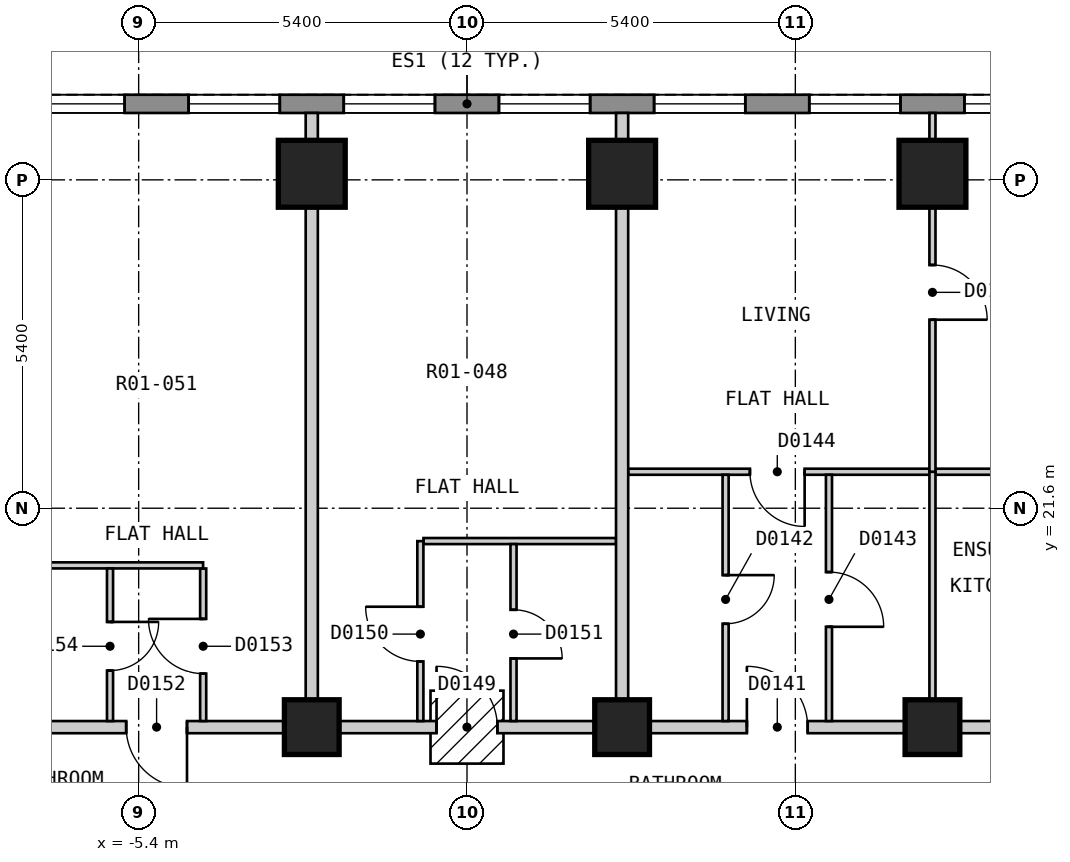
"""IFC4 building model, lengths in metres.
Left out: names, types, materials, properties, quantities, classifications, styles, units other than length and angle.
Written with IfcOpenShell. Run it as: python <this file> out.ifc"""

import sys

from ifc_helpers import new_model, si_unit, direction, frame, frame_2d, origin, origin_2d, place, context, subcontext, project, spatial, polyline, rectangle, outline, extrude, element, fill, save


model = new_model("IFC4")
c1 = context("Model", 3, precision=1e-05, world=origin(), true_north=direction((0.0, 1.0)))
c2 = subcontext(c1, "Body", "Model", "MODEL_VIEW")
j1 = project(units=[si_unit("LENGTHUNIT", "METRE"), si_unit("PLANEANGLEUNIT", "RADIAN")], contexts=[c1])
p1 = place(None, origin())
s1 = spatial("IfcSite", under=j1, at=p1, CompositionType="ELEMENT")
p2 = place(p1, origin())
s2 = spatial("IfcBuilding", under=s1, at=p2, CompositionType="ELEMENT")
p3 = place(p2, frame((0.0, 0.0, 23.4)))
s3 = spatial("IfcBuildingStorey", under=s2, at=p3, CompositionType="ELEMENT", Elevation=23.4)
for number, where, z_axis, x_axis in (
    (1, (7.655, 27.1, 0.0), (0.0, 0.0, 1.0), (-1.0, 0.0, 0.0)),
    (2, (2.551, 27.1, 0.0), (0.0, 0.0, 1.0), (-1.0, 0.0, 0.0)),
    (3, (-2.553, 27.1, 0.0), (0.0, 0.0, 1.0), (-1.0, 0.0, 0.0)),
):
    element("IfcColumn", number, at=place(p3, frame(where, z_axis=z_axis, x_axis=x_axis)), inside=s3, PredefinedType="COLUMN", context=c2, shape_type="SweptSolid", body=[
        extrude(rectangle(XDim=1.1, YDim=1.1, at=origin_2d()), origin(), (0.0, 0.0, 1.0), 3.0),
    ])
for number, where, z_axis, x_axis in (
    (4, (7.655, 18.0, 0.0), (0.0, 0.0, 1.0), (-1.0, 0.0, 0.0)),
    (5, (2.551, 18.0, 0.0), (0.0, 0.0, 1.0), (-1.0, 0.0, 0.0)),
    (6, (-2.553, 18.0, 0.0), (0.0, 0.0, 1.0), (-1.0, 0.0, 0.0)),
):
    element("IfcColumn", number, at=place(p3, frame(where, z_axis=z_axis, x_axis=x_axis)), inside=s3, PredefinedType="COLUMN", context=c2, shape_type="SweptSolid", body=[
        extrude(rectangle(XDim=0.9, YDim=0.9, at=origin_2d()), origin(), (0.0, 0.0, 1.0), 3.0),
    ])
p4 = place(p3, frame((13.51, 28.25, 0.0), z_axis=(0.0, 0.0, 1.0), x_axis=(-1.0, 0.0, 0.0)))
e7 = element("IfcWall", 7, at=p4, inside=s3, PredefinedType="SOLIDWALL", context=c2, shape_type="SweptSolid", body=[
    extrude(outline(polyline([(0.0, -0.15), (27.02, -0.15), (26.94, 0.15), (0.08, 0.15), (0.0, -0.15)])), origin(), (0.0, 0.0, 1.0), 2.7),
])
p5 = place(p4, frame((1.277, 0.0, 0.15)))
e8 = element("IfcOpeningElement", 8, at=p5, cuts=e7, PredefinedType="OPENING", context=c2, shape_type="SweptSolid", body=[
    extrude(rectangle(XDim=1.5, YDim=2.1, at=frame_2d((0.75, 1.05))), frame((0.0, 0.16, 0.0), z_axis=(0.0, -1.0, 0.0), x_axis=(1.0, 0.0, 0.0)), (0.0, 0.0, 1.0), 0.32),
])
p6 = place(p4, frame((3.829, 0.0, 0.15)))
e9 = element("IfcOpeningElement", 9, at=p6, cuts=e7, PredefinedType="OPENING", context=c2, shape_type="SweptSolid", body=[
    extrude(rectangle(XDim=1.5, YDim=2.1, at=frame_2d((0.75, 1.05))), frame((0.0, 0.16, 0.0), z_axis=(0.0, -1.0, 0.0), x_axis=(1.0, 0.0, 0.0)), (0.0, 0.0, 1.0), 0.32),
])
p7 = place(p4, frame((6.381, 0.0, 0.15)))
e10 = element("IfcOpeningElement", 10, at=p7, cuts=e7, PredefinedType="OPENING", context=c2, shape_type="SweptSolid", body=[
    extrude(rectangle(XDim=1.5, YDim=2.1, at=frame_2d((0.75, 1.05))), frame((0.0, 0.16, 0.0), z_axis=(0.0, -1.0, 0.0), x_axis=(1.0, 0.0, 0.0)), (0.0, 0.0, 1.0), 0.32),
])
p8 = place(p4, frame((8.933, 0.0, 0.15)))
e11 = element("IfcOpeningElement", 11, at=p8, cuts=e7, PredefinedType="OPENING", context=c2, shape_type="SweptSolid", body=[
    extrude(rectangle(XDim=1.5, YDim=2.1, at=frame_2d((0.75, 1.05))), frame((0.0, 0.16, 0.0), z_axis=(0.0, -1.0, 0.0), x_axis=(1.0, 0.0, 0.0)), (0.0, 0.0, 1.0), 0.32),
])
p9 = place(p4, frame((11.485, 0.0, 0.15)))
e12 = element("IfcOpeningElement", 12, at=p9, cuts=e7, PredefinedType="OPENING", context=c2, shape_type="SweptSolid", body=[
    extrude(rectangle(XDim=1.5, YDim=2.1, at=frame_2d((0.75, 1.05))), frame((0.0, 0.16, 0.0), z_axis=(0.0, -1.0, 0.0), x_axis=(1.0, 0.0, 0.0)), (0.0, 0.0, 1.0), 0.32),
])
p10 = place(p4, frame((14.037, 0.0, 0.15)))
e13 = element("IfcOpeningElement", 13, at=p10, cuts=e7, PredefinedType="OPENING", context=c2, shape_type="SweptSolid", body=[
    extrude(rectangle(XDim=1.5, YDim=2.1, at=frame_2d((0.75, 1.05))), frame((0.0, 0.16, 0.0), z_axis=(0.0, -1.0, 0.0), x_axis=(1.0, 0.0, 0.0)), (0.0, 0.0, 1.0), 0.32),
])
p11 = place(p4, frame((16.589, 0.0, 0.15)))
e14 = element("IfcOpeningElement", 14, at=p11, cuts=e7, PredefinedType="OPENING", context=c2, shape_type="SweptSolid", body=[
    extrude(rectangle(XDim=1.5, YDim=2.1, at=frame_2d((0.75, 1.05))), frame((0.0, 0.16, 0.0), z_axis=(0.0, -1.0, 0.0), x_axis=(1.0, 0.0, 0.0)), (0.0, 0.0, 1.0), 0.32),
])
p12 = place(p4, frame((19.141, 0.0, 0.15)))
e15 = element("IfcOpeningElement", 15, at=p12, cuts=e7, PredefinedType="OPENING", context=c2, shape_type="SweptSolid", body=[
    extrude(rectangle(XDim=1.5, YDim=2.1, at=frame_2d((0.75, 1.05))), frame((0.0, 0.16, 0.0), z_axis=(0.0, -1.0, 0.0), x_axis=(1.0, 0.0, 0.0)), (0.0, 0.0, 1.0), 0.32),
])
p13 = place(p4, frame((21.693, 0.0, 0.15)))
e16 = element("IfcOpeningElement", 16, at=p13, cuts=e7, PredefinedType="OPENING", context=c2, shape_type="SweptSolid", body=[
    extrude(rectangle(XDim=1.5, YDim=2.1, at=frame_2d((0.75, 1.05))), frame((0.0, 0.16, 0.0), z_axis=(0.0, -1.0, 0.0), x_axis=(1.0, 0.0, 0.0)), (0.0, 0.0, 1.0), 0.32),
])
p14 = place(p4, frame((24.245, 0.0, 0.15)))
e17 = element("IfcOpeningElement", 17, at=p14, cuts=e7, PredefinedType="OPENING", context=c2, shape_type="SweptSolid", body=[
    extrude(rectangle(XDim=1.5, YDim=2.1, at=frame_2d((0.75, 1.05))), frame((0.0, 0.16, 0.0), z_axis=(0.0, -1.0, 0.0), x_axis=(1.0, 0.0, 0.0)), (0.0, 0.0, 1.0), 0.32),
])
p15 = place(p3, frame((-10.276, 18.0, 0.0), z_axis=(0.0, 0.0, 1.0), x_axis=(1.0, 0.0, 0.0)))
e18 = element("IfcWall", 18, at=p15, inside=s3, PredefinedType="PARTITIONING", context=c2, shape_type="SweptSolid", body=[
    extrude(rectangle(XDim=20.61, YDim=0.2, at=frame_2d((10.305, 0.0))), origin(), (0.0, 0.0, 1.0), 2.7),
])
p16 = place(p15, frame((14.879, 0.0, 0.0)))
e19 = element("IfcOpeningElement", 19, at=p16, cuts=e18, PredefinedType="OPENING", context=c2, shape_type="SweptSolid", body=[
    extrude(rectangle(XDim=1.0, YDim=2.1, at=frame_2d((0.5, 1.05))), frame((0.0, 0.11, 0.0), z_axis=(0.0, -1.0, 0.0), x_axis=(1.0, 0.0, 0.0)), (0.0, 0.0, 1.0), 0.22),
])
p17 = place(p15, frame((9.775, 0.0, 0.0)))
e20 = element("IfcOpeningElement", 20, at=p17, cuts=e18, PredefinedType="OPENING", context=c2, shape_type="SweptSolid", body=[
    extrude(rectangle(XDim=1.0, YDim=2.1, at=frame_2d((0.5, 1.05))), frame((0.0, 0.11, 0.0), z_axis=(0.0, -1.0, 0.0), x_axis=(1.0, 0.0, 0.0)), (0.0, 0.0, 1.0), 0.22),
])
p18 = place(p15, frame((4.671, 0.0, 0.0)))
e21 = element("IfcOpeningElement", 21, at=p18, cuts=e18, PredefinedType="OPENING", context=c2, shape_type="SweptSolid", body=[
    extrude(rectangle(XDim=1.0, YDim=2.1, at=frame_2d((0.5, 1.05))), frame((0.0, 0.11, 0.0), z_axis=(0.0, -1.0, 0.0), x_axis=(1.0, 0.0, 0.0)), (0.0, 0.0, 1.0), 0.22),
])
p19 = place(p15, frame((0.837, 0.0, 0.0)))
e22 = element("IfcOpeningElement", 22, at=p19, cuts=e18, PredefinedType="OPENING", context=c2, shape_type="SweptSolid", body=[
    extrude(rectangle(XDim=0.8, YDim=2.1, at=frame_2d((0.4, 1.05))), frame((0.0, 0.11, 0.0), z_axis=(0.0, -1.0, 0.0), x_axis=(1.0, 0.0, 0.0)), (0.0, 0.0, 1.0), 0.22),
])
p20 = place(p3, frame((-4.339, 20.609, 0.0), z_axis=(0.0, 0.0, 1.0), x_axis=(0.0, -1.0, 0.0)))
e23 = element("IfcWall", 23, at=p20, inside=s3, PredefinedType="PARTITIONING", context=c2, shape_type="SweptSolid", body=[
    extrude(rectangle(XDim=2.509, YDim=0.1, at=frame_2d((1.254, 0.0))), origin(), (0.0, 0.0, 1.0), 2.7),
])
p21 = place(p20, frame((0.829, 0.0, 0.0)))
e24 = element("IfcOpeningElement", 24, at=p21, cuts=e23, PredefinedType="OPENING", context=c2, shape_type="SweptSolid", body=[
    extrude(rectangle(XDim=0.9, YDim=2.1, at=frame_2d((0.45, 1.05))), frame((0.0, 0.06, 0.0), z_axis=(0.0, -1.0, 0.0), x_axis=(1.0, 0.0, 0.0)), (0.0, 0.0, 1.0), 0.12),
])
p22 = place(p3, frame((-7.557, 20.66, 0.0), z_axis=(0.0, 0.0, 1.0), x_axis=(1.0, 0.0, 0.0)))
e25 = element("IfcWall", 25, at=p22, inside=s3, PredefinedType="PARTITIONING", context=c2, shape_type="SweptSolid", body=[
    extrude(rectangle(XDim=3.217, YDim=0.1, at=frame_2d((1.608, 0.0))), origin(), (0.0, 0.0, 1.0), 2.7),
])
p23 = place(p3, frame((-0.716, 21.06, 0.0), z_axis=(0.0, 0.0, 1.0), x_axis=(1.0, 0.0, 0.0)))
e26 = element("IfcWall", 26, at=p23, inside=s3, PredefinedType="PARTITIONING", context=c2, shape_type="SweptSolid", body=[
    extrude(rectangle(XDim=3.167, YDim=0.1, at=frame_2d((1.583, 0.0))), origin(), (0.0, 0.0, 1.0), 2.7),
])
p24 = place(p3, frame((2.651, 22.2, 0.0), z_axis=(0.0, 0.0, 1.0), x_axis=(1.0, 0.0, 0.0)))
e27 = element("IfcWall", 27, at=p24, inside=s3, PredefinedType="PARTITIONING", context=c2, shape_type="SweptSolid", body=[
    extrude(rectangle(XDim=10.109, YDim=0.1, at=frame_2d((5.055, 0.0))), origin(), (0.0, 0.0, 1.0), 2.7),
])
p25 = place(p24, frame((2.002, 0.0, 0.0)))
e28 = element("IfcOpeningElement", 28, at=p25, cuts=e27, PredefinedType="OPENING", context=c2, shape_type="SweptSolid", body=[
    extrude(rectangle(XDim=0.9, YDim=2.1, at=frame_2d((0.45, 1.05))), frame((0.0, 0.06, 0.0), z_axis=(0.0, -1.0, 0.0), x_axis=(1.0, 0.0, 0.0)), (0.0, 0.0, 1.0), 0.12),
])
p26 = place(p24, frame((7.185, 0.0, 0.0)))
e29 = element("IfcOpeningElement", 29, at=p26, cuts=e27, PredefinedType="OPENING", context=c2, shape_type="SweptSolid", body=[
    extrude(rectangle(XDim=0.8, YDim=2.1, at=frame_2d((0.4, 1.05))), frame((0.0, 0.06, 0.0), z_axis=(0.0, -1.0, 0.0), x_axis=(1.0, 0.0, 0.0)), (0.0, 0.0, 1.0), 0.12),
])
p27 = place(p3, frame((4.253, 18.1, 0.0), z_axis=(0.0, 0.0, 1.0), x_axis=(0.0, 1.0, 0.0)))
e30 = element("IfcWall", 30, at=p27, inside=s3, PredefinedType="PARTITIONING", context=c2, shape_type="SweptSolid", body=[
    extrude(rectangle(XDim=4.05, YDim=0.1, at=frame_2d((2.025, 0.0))), origin(), (0.0, 0.0, 1.0), 2.7),
])
p28 = place(p27, frame((1.6, 0.0, 0.0)))
e31 = element("IfcOpeningElement", 31, at=p28, cuts=e30, PredefinedType="OPENING", context=c2, shape_type="SweptSolid", body=[
    extrude(rectangle(XDim=0.8, YDim=2.1, at=frame_2d((0.4, 1.05))), frame((0.0, 0.06, 0.0), z_axis=(0.0, -1.0, 0.0), x_axis=(1.0, 0.0, 0.0)), (0.0, 0.0, 1.0), 0.12),
])
p29 = place(p3, frame((5.953, 18.1, 0.0), z_axis=(0.0, 0.0, 1.0), x_axis=(0.0, 1.0, 0.0)))
e32 = element("IfcWall", 32, at=p29, inside=s3, PredefinedType="PARTITIONING", context=c2, shape_type="SweptSolid", body=[
    extrude(rectangle(XDim=4.05, YDim=0.1, at=frame_2d((2.025, 0.0))), origin(), (0.0, 0.0, 1.0), 2.7),
])
p30 = place(p29, frame((1.55, 0.0, 0.0)))
e33 = element("IfcOpeningElement", 33, at=p30, cuts=e32, PredefinedType="OPENING", context=c2, shape_type="SweptSolid", body=[
    extrude(rectangle(XDim=0.9, YDim=2.1, at=frame_2d((0.45, 1.05))), frame((0.0, 0.06, 0.0), z_axis=(0.0, -1.0, 0.0), x_axis=(1.0, 0.0, 0.0)), (0.0, 0.0, 1.0), 0.12),
])
p31 = place(p3, frame((0.765, 18.1, 0.0), z_axis=(0.0, 0.0, 1.0), x_axis=(0.0, 1.0, 0.0)))
e34 = element("IfcWall", 34, at=p31, inside=s3, PredefinedType="PARTITIONING", context=c2, shape_type="SweptSolid", body=[
    extrude(rectangle(XDim=2.91, YDim=0.1, at=frame_2d((1.455, 0.0))), origin(), (0.0, 0.0, 1.0), 2.7),
])
p32 = place(p31, frame((1.03, 0.0, 0.0)))
e35 = element("IfcOpeningElement", 35, at=p32, cuts=e34, PredefinedType="OPENING", context=c2, shape_type="SweptSolid", body=[
    extrude(rectangle(XDim=0.8, YDim=2.1, at=frame_2d((0.4, 1.05))), frame((0.0, 0.06, 0.0), z_axis=(0.0, -1.0, 0.0), x_axis=(1.0, 0.0, 0.0)), (0.0, 0.0, 1.0), 0.12),
])
p33 = place(p3, frame((7.655, 18.1, 0.0), z_axis=(0.0, 0.0, 1.0), x_axis=(0.0, 1.0, 0.0)))
e36 = element("IfcWall", 36, at=p33, inside=s3, PredefinedType="PARTITIONING", context=c2, shape_type="SweptSolid", body=[
    extrude(rectangle(XDim=4.1, YDim=0.1, at=frame_2d((2.05, 0.0))), origin(), (0.0, 0.0, 1.0), 2.7),
])
p34 = place(p3, frame((-5.871, 18.1, 0.0), z_axis=(0.0, 0.0, 1.0), x_axis=(0.0, 1.0, 0.0)))
e37 = element("IfcWall", 37, at=p34, inside=s3, PredefinedType="PARTITIONING", context=c2, shape_type="SweptSolid", body=[
    extrude(rectangle(XDim=2.51, YDim=0.1, at=frame_2d((1.255, 0.0))), origin(), (0.0, 0.0, 1.0), 2.7),
])
p35 = place(p34, frame((0.83, 0.0, 0.0)))
e38 = element("IfcOpeningElement", 38, at=p35, cuts=e37, PredefinedType="OPENING", context=c2, shape_type="SweptSolid", body=[
    extrude(rectangle(XDim=0.8, YDim=2.1, at=frame_2d((0.4, 1.05))), frame((0.0, 0.06, 0.0), z_axis=(0.0, -1.0, 0.0), x_axis=(1.0, 0.0, 0.0)), (0.0, 0.0, 1.0), 0.12),
])
p36 = place(p3, frame((-0.767, 18.1, 0.0), z_axis=(0.0, 0.0, 1.0), x_axis=(0.0, 1.0, 0.0)))
e39 = element("IfcWall", 39, at=p36, inside=s3, PredefinedType="PARTITIONING", context=c2, shape_type="SweptSolid", body=[
    extrude(rectangle(XDim=2.959, YDim=0.1, at=frame_2d((1.479, 0.0))), origin(), (0.0, 0.0, 1.0), 2.7),
])
p37 = place(p36, frame((0.98, 0.0, 0.0)))
e40 = element("IfcOpeningElement", 40, at=p37, cuts=e39, PredefinedType="OPENING", context=c2, shape_type="SweptSolid", body=[
    extrude(rectangle(XDim=0.9, YDim=2.1, at=frame_2d((0.45, 1.05))), frame((0.0, 0.06, 0.0), z_axis=(0.0, -1.0, 0.0), x_axis=(1.0, 0.0, 0.0)), (0.0, 0.0, 1.0), 0.12),
])
for number, where, z_axis, x_axis in (
    (41, (-2.553, 28.1, 0.0), (0.0, 0.0, 1.0), (0.0, -1.0, 0.0)),
    (42, (2.551, 18.1, 0.0), (0.0, 0.0, 1.0), (0.0, 1.0, 0.0)),
):
    element("IfcWall", number, at=place(p3, frame(where, z_axis=z_axis, x_axis=x_axis)), inside=s3, PredefinedType="PARTITIONING", context=c2, shape_type="SweptSolid", body=[
        extrude(rectangle(XDim=10.0, YDim=0.2, at=frame_2d((5.0, 0.0))), origin(), (0.0, 0.0, 1.0), 2.7),
    ])
p38 = place(p3, frame((7.655, 22.2, 0.0), z_axis=(0.0, 0.0, 1.0), x_axis=(0.0, 1.0, 0.0)))
e43 = element("IfcWall", 43, at=p38, inside=s3, PredefinedType="PARTITIONING", context=c2, shape_type="SweptSolid", body=[
    extrude(rectangle(XDim=5.9, YDim=0.1, at=frame_2d((2.95, 0.0))), origin(), (0.0, 0.0, 1.0), 2.7),
])
p39 = place(p38, frame((2.5, 0.0, 0.0)))
e44 = element("IfcOpeningElement", 44, at=p39, cuts=e43, PredefinedType="OPENING", context=c2, shape_type="SweptSolid", body=[
    extrude(rectangle(XDim=0.9, YDim=2.1, at=frame_2d((0.45, 1.05))), frame((0.0, 0.06, 0.0), z_axis=(0.0, -1.0, 0.0), x_axis=(1.0, 0.0, 0.0)), (0.0, 0.0, 1.0), 0.12),
])
p40 = place(p6, origin())
e45 = element("IfcWindow", 45, at=p40, inside=s3, PartitioningType="SINGLE_PANEL", PredefinedType="WINDOW", context=c2, shape_type="SweptSolid", body=[
    extrude(rectangle(XDim=1.5, YDim=2.1, at=frame_2d((0.75, 1.05))), frame((0.0, 0.03, 0.0), z_axis=(0.0, -1.0, 0.0), x_axis=(1.0, 0.0, 0.0)), (0.0, 0.0, 1.0), 0.06),
])
fill(e9, e45)
p41 = place(p7, origin())
e46 = element("IfcWindow", 46, at=p41, inside=s3, PartitioningType="SINGLE_PANEL", PredefinedType="WINDOW", context=c2, shape_type="SweptSolid", body=[
    extrude(rectangle(XDim=1.5, YDim=2.1, at=frame_2d((0.75, 1.05))), frame((0.0, 0.03, 0.0), z_axis=(0.0, -1.0, 0.0), x_axis=(1.0, 0.0, 0.0)), (0.0, 0.0, 1.0), 0.06),
])
fill(e10, e46)
p42 = place(p8, origin())
e47 = element("IfcWindow", 47, at=p42, inside=s3, PartitioningType="SINGLE_PANEL", PredefinedType="WINDOW", context=c2, shape_type="SweptSolid", body=[
    extrude(rectangle(XDim=1.5, YDim=2.1, at=frame_2d((0.75, 1.05))), frame((0.0, 0.03, 0.0), z_axis=(0.0, -1.0, 0.0), x_axis=(1.0, 0.0, 0.0)), (0.0, 0.0, 1.0), 0.06),
])
fill(e11, e47)
p43 = place(p9, origin())
e48 = element("IfcWindow", 48, at=p43, inside=s3, PartitioningType="SINGLE_PANEL", PredefinedType="WINDOW", context=c2, shape_type="SweptSolid", body=[
    extrude(rectangle(XDim=1.5, YDim=2.1, at=frame_2d((0.75, 1.05))), frame((0.0, 0.03, 0.0), z_axis=(0.0, -1.0, 0.0), x_axis=(1.0, 0.0, 0.0)), (0.0, 0.0, 1.0), 0.06),
])
fill(e12, e48)
p44 = place(p10, origin())
e49 = element("IfcWindow", 49, at=p44, inside=s3, PartitioningType="SINGLE_PANEL", PredefinedType="WINDOW", context=c2, shape_type="SweptSolid", body=[
    extrude(rectangle(XDim=1.5, YDim=2.1, at=frame_2d((0.75, 1.05))), frame((0.0, 0.03, 0.0), z_axis=(0.0, -1.0, 0.0), x_axis=(1.0, 0.0, 0.0)), (0.0, 0.0, 1.0), 0.06),
])
fill(e13, e49)
p45 = place(p11, origin())
e50 = element("IfcWindow", 50, at=p45, inside=s3, PartitioningType="SINGLE_PANEL", PredefinedType="WINDOW", context=c2, shape_type="SweptSolid", body=[
    extrude(rectangle(XDim=1.5, YDim=2.1, at=frame_2d((0.75, 1.05))), frame((0.0, 0.03, 0.0), z_axis=(0.0, -1.0, 0.0), x_axis=(1.0, 0.0, 0.0)), (0.0, 0.0, 1.0), 0.06),
])
fill(e14, e50)
p46 = place(p12, origin())
e51 = element("IfcWindow", 51, at=p46, inside=s3, PartitioningType="SINGLE_PANEL", PredefinedType="WINDOW", context=c2, shape_type="SweptSolid", body=[
    extrude(rectangle(XDim=1.5, YDim=2.1, at=frame_2d((0.75, 1.05))), frame((0.0, 0.03, 0.0), z_axis=(0.0, -1.0, 0.0), x_axis=(1.0, 0.0, 0.0)), (0.0, 0.0, 1.0), 0.06),
])
fill(e15, e51)
p47 = place(p16, origin())
e52 = element("IfcDoor", 52, at=p47, inside=s3, OperationType="SINGLE_SWING_LEFT", PredefinedType="DOOR", context=c2, shape_type="SweptSolid", body=[
    extrude(rectangle(XDim=1.0, YDim=2.1, at=frame_2d((0.5, 1.05))), frame((0.0, 0.025, 0.0), z_axis=(0.0, -1.0, 0.0), x_axis=(1.0, 0.0, 0.0)), (0.0, 0.0, 1.0), 0.05),
])
fill(e19, e52)
p48 = place(p28, origin())
e53 = element("IfcDoor", 53, at=p48, inside=s3, OperationType="SINGLE_SWING_RIGHT", PredefinedType="DOOR", context=c2, shape_type="SweptSolid", body=[
    extrude(rectangle(XDim=0.8, YDim=2.1, at=frame_2d((0.4, 1.05))), frame((0.0, 0.025, 0.0), z_axis=(0.0, -1.0, 0.0), x_axis=(1.0, 0.0, 0.0)), (0.0, 0.0, 1.0), 0.05),
])
fill(e31, e53)
p49 = place(p30, origin())
e54 = element("IfcDoor", 54, at=p49, inside=s3, OperationType="SINGLE_SWING_LEFT", PredefinedType="DOOR", context=c2, shape_type="SweptSolid", body=[
    extrude(rectangle(XDim=0.9, YDim=2.1, at=frame_2d((0.45, 1.05))), frame((0.0, 0.025, 0.0), z_axis=(0.0, -1.0, 0.0), x_axis=(1.0, 0.0, 0.0)), (0.0, 0.0, 1.0), 0.05),
])
fill(e33, e54)
p50 = place(p25, origin())
e55 = element("IfcDoor", 55, at=p50, inside=s3, OperationType="SINGLE_SWING_RIGHT", PredefinedType="DOOR", context=c2, shape_type="SweptSolid", body=[
    extrude(rectangle(XDim=0.9, YDim=2.1, at=frame_2d((0.45, 1.05))), frame((0.0, 0.025, 0.0), z_axis=(0.0, -1.0, 0.0), x_axis=(1.0, 0.0, 0.0)), (0.0, 0.0, 1.0), 0.05),
])
fill(e28, e55)
p51 = place(p39, origin())
e56 = element("IfcDoor", 56, at=p51, inside=s3, OperationType="SINGLE_SWING_LEFT", PredefinedType="DOOR", context=c2, shape_type="SweptSolid", body=[
    extrude(rectangle(XDim=0.9, YDim=2.1, at=frame_2d((0.45, 1.05))), frame((0.0, 0.025, 0.0), z_axis=(0.0, -1.0, 0.0), x_axis=(1.0, 0.0, 0.0)), (0.0, 0.0, 1.0), 0.05),
])
fill(e44, e56)
p52 = place(p17, origin())
e57 = element("IfcDoor", 57, at=p52, inside=s3, OperationType="SINGLE_SWING_LEFT", PredefinedType="DOOR", context=c2, shape_type="SweptSolid", body=[
    extrude(rectangle(XDim=1.0, YDim=2.1, at=frame_2d((0.5, 1.05))), frame((0.0, 0.025, 0.0), z_axis=(0.0, -1.0, 0.0), x_axis=(1.0, 0.0, 0.0)), (0.0, 0.0, 1.0), 0.05),
])
fill(e20, e57)
p53 = place(p37, origin())
e58 = element("IfcDoor", 58, at=p53, inside=s3, OperationType="SINGLE_SWING_RIGHT", PredefinedType="DOOR", context=c2, shape_type="SweptSolid", body=[
    extrude(rectangle(XDim=0.9, YDim=2.1, at=frame_2d((0.45, 1.05))), frame((0.0, 0.025, 0.0), z_axis=(0.0, -1.0, 0.0), x_axis=(1.0, 0.0, 0.0)), (0.0, 0.0, 1.0), 0.05),
])
fill(e40, e58)
p54 = place(p32, origin())
e59 = element("IfcDoor", 59, at=p54, inside=s3, OperationType="SINGLE_SWING_LEFT", PredefinedType="DOOR", context=c2, shape_type="SweptSolid", body=[
    extrude(rectangle(XDim=0.8, YDim=2.1, at=frame_2d((0.4, 1.05))), frame((0.0, 0.025, 0.0), z_axis=(0.0, -1.0, 0.0), x_axis=(1.0, 0.0, 0.0)), (0.0, 0.0, 1.0), 0.05),
])
fill(e35, e59)
p55 = place(p18, origin())
e60 = element("IfcDoor", 60, at=p55, inside=s3, OperationType="SINGLE_SWING_RIGHT", PredefinedType="DOOR", context=c2, shape_type="SweptSolid", body=[
    extrude(rectangle(XDim=1.0, YDim=2.1, at=frame_2d((0.5, 1.05))), frame((0.0, 0.025, 0.0), z_axis=(0.0, -1.0, 0.0), x_axis=(1.0, 0.0, 0.0)), (0.0, 0.0, 1.0), 0.05),
])
fill(e21, e60)
p56 = place(p21, origin())
e61 = element("IfcDoor", 61, at=p56, inside=s3, OperationType="SINGLE_SWING_LEFT", PredefinedType="DOOR", context=c2, shape_type="SweptSolid", body=[
    extrude(rectangle(XDim=0.9, YDim=2.1, at=frame_2d((0.45, 1.05))), frame((0.0, 0.025, 0.0), z_axis=(0.0, -1.0, 0.0), x_axis=(1.0, 0.0, 0.0)), (0.0, 0.0, 1.0), 0.05),
])
fill(e24, e61)
p57 = place(p35, origin())
e62 = element("IfcDoor", 62, at=p57, inside=s3, OperationType="SINGLE_SWING_RIGHT", PredefinedType="DOOR", context=c2, shape_type="SweptSolid", body=[
    extrude(rectangle(XDim=0.8, YDim=2.1, at=frame_2d((0.4, 1.05))), frame((0.0, 0.025, 0.0), z_axis=(0.0, -1.0, 0.0), x_axis=(1.0, 0.0, 0.0)), (0.0, 0.0, 1.0), 0.05),
])
fill(e38, e62)
save(model, sys.argv[1])
